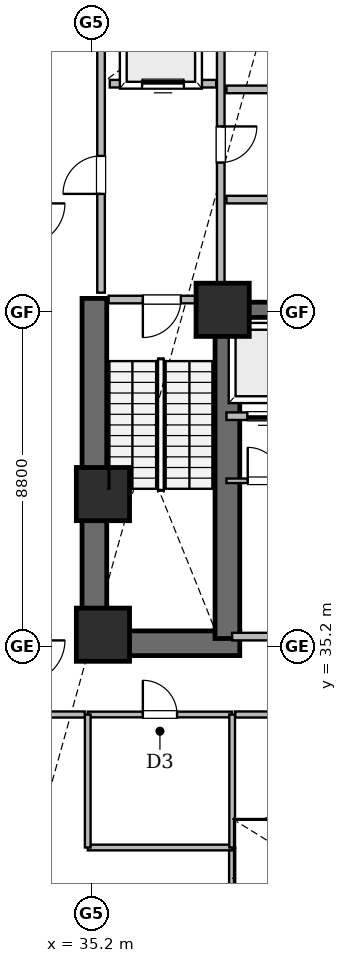
"""IFC4 building model, lengths in metres.
Left out: names, types, materials, properties, quantities, classifications, styles, units other than length and angle.
Written with IfcOpenShell. Run it as: python <this file> out.ifc"""

import sys

from ifc_helpers import new_model, si_unit, direction, frame, frame_2d, origin, origin_2d, place, context, subcontext, project, spatial, rectangle, extrude, element, fill, save


model = new_model("IFC4")
c1 = context("Model", 3, precision=1e-05, world=origin(), true_north=direction((0.0, 1.0)))
c2 = subcontext(c1, "Body", "Model", "MODEL_VIEW")
j1 = project(units=[si_unit("LENGTHUNIT", "METRE"), si_unit("PLANEANGLEUNIT", "RADIAN")], contexts=[c1])
p1 = place(None, origin())
s1 = spatial("IfcSite", under=j1, at=p1, CompositionType="ELEMENT")
p2 = place(p1, origin())
s2 = spatial("IfcBuilding", under=s1, at=p2, CompositionType="ELEMENT")
p3 = place(p2, frame((0.0, 0.0, 4.8)))
s3 = spatial("IfcBuildingStorey", under=s2, at=p3, CompositionType="ELEMENT", Elevation=4.8)
p4 = place(p3, frame((34.95, 35.275, 0.0), z_axis=(0.0, 0.0, 1.0), x_axis=(1.0, 0.0, 0.0)))
e1 = element("IfcWall", 1, at=p4, inside=s3, PredefinedType="SHEAR", context=c2, shape_type="SweptSolid", body=[
    extrude(rectangle(XDim=4.15, YDim=0.65, at=frame_2d((2.075, 0.0))), origin(), (0.0, 0.0, 1.0), 4.5),
])
p5 = place(p3, frame((35.275, 34.95, 0.0), z_axis=(0.0, 0.0, 1.0), x_axis=(0.0, 1.0, 0.0)))
e2 = element("IfcWall", 2, at=p5, inside=s3, PredefinedType="SHEAR", context=c2, shape_type="SweptSolid", body=[
    extrude(rectangle(XDim=9.4, YDim=0.65, at=frame_2d((4.7, 0.0))), origin(), (0.0, 0.0, 1.0), 4.5),
])
p6 = place(p3, frame((38.775, 35.4, 0.0), z_axis=(0.0, 0.0, 1.0), x_axis=(0.0, 1.0, 0.0)))
e3 = element("IfcWall", 3, at=p6, inside=s3, PredefinedType="SHEAR", context=c2, shape_type="SweptSolid", body=[
    extrude(rectangle(XDim=8.95, YDim=0.65, at=frame_2d((4.475, 0.0))), origin(), (0.0, 0.0, 1.0), 4.5),
])
p7 = place(p3, frame((38.75, 44.05, 0.0), z_axis=(0.0, 0.0, 1.0), x_axis=(1.0, 0.0, 0.0)))
e4 = element("IfcWall", 4, at=p7, inside=s3, PredefinedType="SHEAR", context=c2, shape_type="SweptSolid", body=[
    extrude(rectangle(XDim=4.2, YDim=0.4, at=frame_2d((2.1, 0.0))), origin(), (0.0, 0.0, 1.0), 4.5),
])
for number, where, z_axis, x_axis in (
    (5, (35.5, 35.5, 0.0), (0.0, 0.0, 1.0), (1.0, 0.0, 0.0)),
    (6, (38.65, 44.05, 0.0), (0.0, 0.0, 1.0), (1.0, 0.0, 0.0)),
    (7, (35.5, 39.2, 0.0), (0.0, 0.0, 1.0), (1.0, 0.0, 0.0)),
):
    element("IfcColumn", number, at=place(p3, frame(where, z_axis=z_axis, x_axis=x_axis)), inside=s3, PredefinedType="COLUMN", context=c2, shape_type="SweptSolid", body=[
        extrude(rectangle(XDim=1.4, YDim=1.4, at=origin_2d()), origin(), (0.0, 0.0, 1.0), 4.8),
    ])
p8 = place(p3, frame((38.9, 35.45, 0.0), z_axis=(0.0, 0.0, 1.0), x_axis=(1.0, 0.0, 0.0)))
e8 = element("IfcWall", 8, at=p8, inside=s3, PredefinedType="SOLIDWALL", context=c2, shape_type="SweptSolid", body=[
    extrude(rectangle(XDim=10.2, YDim=0.2, at=frame_2d((5.1, 0.0))), origin(), (0.0, 0.0, 1.0), 4.5),
])
p9 = place(p8, frame((4.6, 0.0, 0.0)))
e9 = element("IfcOpeningElement", 9, at=p9, cuts=e8, PredefinedType="OPENING", context=c2, shape_type="SweptSolid", body=[
    extrude(rectangle(XDim=1.0, YDim=2.15, at=frame_2d((0.5, 1.075))), frame((0.0, 0.11, 0.0), z_axis=(0.0, -1.0, 0.0), x_axis=(1.0, 0.0, 0.0)), (0.0, 0.0, 1.0), 0.22),
])
p10 = place(p3, frame((35.45, 44.5, 0.0), z_axis=(0.0, 0.0, 1.0), x_axis=(0.0, 1.0, 0.0)))
e10 = element("IfcWall", 10, at=p10, inside=s3, PredefinedType="SOLIDWALL", context=c2, shape_type="SweptSolid", body=[
    extrude(rectangle(XDim=7.92, YDim=0.2, at=frame_2d((3.96, 0.0))), origin(), (0.0, 0.0, 1.0), 4.5),
])
p11 = place(p10, frame((2.6, 0.0, 0.0)))
e11 = element("IfcOpeningElement", 11, at=p11, cuts=e10, PredefinedType="OPENING", context=c2, shape_type="SweptSolid", body=[
    extrude(rectangle(XDim=1.0, YDim=2.15, at=frame_2d((0.5, 1.075))), frame((0.0, 0.11, 0.0), z_axis=(0.0, -1.0, 0.0), x_axis=(1.0, 0.0, 0.0)), (0.0, 0.0, 1.0), 0.22),
])
p12 = place(p3, frame((38.6, 44.5, 0.0), z_axis=(0.0, 0.0, 1.0), x_axis=(0.0, 1.0, 0.0)))
e12 = element("IfcWall", 12, at=p12, inside=s3, PredefinedType="SOLIDWALL", context=c2, shape_type="SweptSolid", body=[
    extrude(rectangle(XDim=7.92, YDim=0.2, at=frame_2d((3.96, 0.0))), origin(), (0.0, 0.0, 1.0), 4.5),
])
p13 = place(p12, frame((3.425, 0.0, 0.0)))
e13 = element("IfcOpeningElement", 13, at=p13, cuts=e12, PredefinedType="OPENING", context=c2, shape_type="SweptSolid", body=[
    extrude(rectangle(XDim=0.95, YDim=2.15, at=frame_2d((0.475, 1.075))), frame((0.0, 0.11, 0.0), z_axis=(0.0, -1.0, 0.0), x_axis=(1.0, 0.0, 0.0)), (0.0, 0.0, 1.0), 0.22),
])
p14 = place(p3, frame((38.75, 41.25, 0.0), z_axis=(0.0, 0.0, 1.0), x_axis=(1.0, 0.0, 0.0)))
e14 = element("IfcWall", 14, at=p14, inside=s3, PredefinedType="SOLIDWALL", context=c2, shape_type="SweptSolid", body=[
    extrude(rectangle(XDim=4.33, YDim=0.2, at=frame_2d((2.165, 0.0))), origin(), (0.0, 0.0, 1.0), 4.5),
])
p15 = place(p14, frame((0.55, 0.0, 0.0)))
e15 = element("IfcOpeningElement", 15, at=p15, cuts=e14, PredefinedType="OPENING", context=c2, shape_type="SweptSolid", body=[
    extrude(rectangle(XDim=1.0, YDim=2.15, at=frame_2d((0.5, 1.075))), frame((0.0, 0.11, 0.0), z_axis=(0.0, -1.0, 0.0), x_axis=(1.0, 0.0, 0.0)), (0.0, 0.0, 1.0), 0.22),
])
p16 = place(p14, frame((2.75, 0.0, 0.0)))
e16 = element("IfcOpeningElement", 16, at=p16, cuts=e14, PredefinedType="OPENING", context=c2, shape_type="SweptSolid", body=[
    extrude(rectangle(XDim=1.0, YDim=2.15, at=frame_2d((0.5, 1.075))), frame((0.0, 0.11, 0.0), z_axis=(0.0, -1.0, 0.0), x_axis=(1.0, 0.0, 0.0)), (0.0, 0.0, 1.0), 0.22),
])
p17 = place(p3, frame((38.75, 39.55, 0.0), z_axis=(0.0, 0.0, 1.0), x_axis=(1.0, 0.0, 0.0)))
e17 = element("IfcWall", 17, at=p17, inside=s3, PredefinedType="PARTITIONING", context=c2, shape_type="SweptSolid", body=[
    extrude(rectangle(XDim=4.33, YDim=0.12, at=frame_2d((2.165, 0.0))), origin(), (0.0, 0.0, 1.0), 4.5),
])
p18 = place(p17, frame((0.56, 0.0, 0.0)))
e18 = element("IfcOpeningElement", 18, at=p18, cuts=e17, PredefinedType="OPENING", context=c2, shape_type="SweptSolid", body=[
    extrude(rectangle(XDim=0.88, YDim=2.1, at=frame_2d((0.44, 1.05))), frame((0.0, 0.07, 0.0), z_axis=(0.0, -1.0, 0.0), x_axis=(1.0, 0.0, 0.0)), (0.0, 0.0, 1.0), 0.14),
])
p19 = place(p17, frame((2.86, 0.0, 0.0)))
e19 = element("IfcOpeningElement", 19, at=p19, cuts=e17, PredefinedType="OPENING", context=c2, shape_type="SweptSolid", body=[
    extrude(rectangle(XDim=0.88, YDim=2.1, at=frame_2d((0.44, 1.05))), frame((0.0, 0.07, 0.0), z_axis=(0.0, -1.0, 0.0), x_axis=(1.0, 0.0, 0.0)), (0.0, 0.0, 1.0), 0.14),
])
p20 = place(p3, frame((35.1, 33.4, 0.0), z_axis=(0.0, 0.0, 1.0), x_axis=(1.0, 0.0, 0.0)))
e20 = element("IfcWall", 20, at=p20, inside=s3, PredefinedType="PLUMBINGWALL", context=c2, shape_type="SweptSolid", body=[
    extrude(rectangle(XDim=3.8, YDim=0.15, at=frame_2d((1.9, 0.0))), origin(), (0.0, 0.0, 1.0), 4.0),
])
p21 = place(p20, frame((1.45, 0.0, 0.0)))
e21 = element("IfcOpeningElement", 21, at=p21, cuts=e20, PredefinedType="OPENING", context=c2, shape_type="SweptSolid", body=[
    extrude(rectangle(XDim=0.9, YDim=2.1, at=frame_2d((0.45, 1.05))), frame((0.0, 0.085, 0.0), z_axis=(0.0, -1.0, 0.0), x_axis=(1.0, 0.0, 0.0)), (0.0, 0.0, 1.0), 0.17),
])
p22 = place(p3, frame((35.65, 44.32, 0.0), z_axis=(0.0, 0.0, 1.0), x_axis=(1.0, 0.0, 0.0)))
e22 = element("IfcWall", 22, at=p22, inside=s3, PredefinedType="SOLIDWALL", context=c2, shape_type="SweptSolid", body=[
    extrude(rectangle(XDim=2.8, YDim=0.2, at=frame_2d((1.4, 0.0))), origin(), (0.0, 0.0, 1.0), 4.5),
])
p23 = place(p22, frame((0.9, 0.0, 0.0)))
e23 = element("IfcOpeningElement", 23, at=p23, cuts=e22, PredefinedType="OPENING", context=c2, shape_type="SweptSolid", body=[
    extrude(rectangle(XDim=1.0, YDim=2.15, at=frame_2d((0.5, 1.075))), frame((0.0, 0.11, 0.0), z_axis=(0.0, -1.0, 0.0), x_axis=(1.0, 0.0, 0.0)), (0.0, 0.0, 1.0), 0.22),
])
p24 = place(p3, frame((35.68, 50.0, 0.0), z_axis=(0.0, 0.0, 1.0), x_axis=(1.0, 0.0, 0.0)))
e24 = element("IfcWall", 24, at=p24, inside=s3, PredefinedType="SOLIDWALL", context=c2, shape_type="SweptSolid", body=[
    extrude(rectangle(XDim=2.8, YDim=0.2, at=frame_2d((1.4, 0.0))), origin(), (0.0, 0.0, 1.0), 4.5),
])
p25 = place(p24, frame((0.85, 0.0, 0.0)))
e25 = element("IfcOpeningElement", 25, at=p25, cuts=e24, PredefinedType="OPENING", context=c2, shape_type="SweptSolid", body=[
    extrude(rectangle(XDim=1.1, YDim=2.15, at=frame_2d((0.55, 1.075))), frame((0.0, 0.11, 0.0), z_axis=(0.0, -1.0, 0.0), x_axis=(1.0, 0.0, 0.0)), (0.0, 0.0, 1.0), 0.22),
])
p26 = place(p3, frame((38.904, 14.635, 0.0), z_axis=(0.0, 0.0, 1.0), x_axis=(-0.000271891233, 0.999999963038, 0.0)))
e26 = element("IfcWall", 26, at=p26, inside=s3, PredefinedType="SOLIDWALL", context=c2, shape_type="SweptSolid", body=[
    extrude(rectangle(XDim=15.265, YDim=0.16, at=frame_2d((7.632, 0.0))), origin(), (0.0, 0.0, 1.0), 3.788),
])
p27 = place(p3, frame((38.98, 33.4, 0.0), z_axis=(0.0, 0.0, 1.0), x_axis=(1.0, 0.0, 0.0)))
e27 = element("IfcWall", 27, at=p27, inside=s3, PredefinedType="SOLIDWALL", context=c2, shape_type="SweptSolid", body=[
    extrude(rectangle(XDim=10.04, YDim=0.16, at=frame_2d((5.02, 0.0))), origin(), (0.0, 0.0, 1.0), 4.5),
])
p28 = place(p3, frame((38.75, 49.85, 0.0), z_axis=(0.0, 0.0, 1.0), x_axis=(1.0, 0.0, 0.0)))
e28 = element("IfcWall", 28, at=p28, inside=s3, PredefinedType="SOLIDWALL", context=c2, shape_type="SweptSolid", body=[
    extrude(rectangle(XDim=5.0, YDim=0.2, at=frame_2d((2.5, 0.0))), origin(), (0.0, 0.0, 1.0), 4.5),
])
p29 = place(p3, frame((38.75, 46.95, 0.0), z_axis=(0.0, 0.0, 1.0), x_axis=(1.0, 0.0, 0.0)))
e29 = element("IfcWall", 29, at=p29, inside=s3, PredefinedType="SOLIDWALL", context=c2, shape_type="SweptSolid", body=[
    extrude(rectangle(XDim=4.33, YDim=0.2, at=frame_2d((2.165, 0.0))), origin(), (0.0, 0.0, 1.0), 4.5),
])
p30 = place(p3, frame((35.1, 29.9, 0.0), z_axis=(0.0, 0.0, 1.0), x_axis=(1.0, 0.0, 0.0)))
e30 = element("IfcWall", 30, at=p30, inside=s3, PredefinedType="PLUMBINGWALL", context=c2, shape_type="SweptSolid", body=[
    extrude(rectangle(XDim=3.8, YDim=0.15, at=frame_2d((1.9, 0.0))), origin(), (0.0, 0.0, 1.0), 4.5),
])
p31 = place(p3, frame((35.1, 33.4, 0.0), z_axis=(0.0, 0.0, 1.0), x_axis=(0.0, -1.0, 0.0)))
e31 = element("IfcWall", 31, at=p31, inside=s3, PredefinedType="PLUMBINGWALL", context=c2, shape_type="SweptSolid", body=[
    extrude(rectangle(XDim=3.5, YDim=0.15, at=frame_2d((1.75, 0.0))), origin(), (0.0, 0.0, 1.0), 4.5),
])
p32 = place(p3, frame((38.9, 29.9, 0.0), z_axis=(0.0, 0.0, 1.0), x_axis=(0.0, 1.0, 0.0)))
e32 = element("IfcWall", 32, at=p32, inside=s3, PredefinedType="PLUMBINGWALL", context=c2, shape_type="SweptSolid", body=[
    extrude(rectangle(XDim=3.5, YDim=0.15, at=frame_2d((1.75, 0.0))), origin(), (0.0, 0.0, 1.0), 4.0),
])
p33 = place(p3, frame((33.48, 33.4, 0.0), z_axis=(0.0, 0.0, 1.0), x_axis=(1.0, 0.0, 0.0)))
e33 = element("IfcWall", 33, at=p33, inside=s3, PredefinedType="SOLIDWALL", context=c2, shape_type="SweptSolid", body=[
    extrude(rectangle(XDim=1.54, YDim=0.16, at=frame_2d((0.77, 0.0))), origin(), (0.0, 0.0, 1.0), 4.5),
])
p34 = place(p23, frame((1.0, 0.0, 0.0), z_axis=(0.0, 0.0, 1.0), x_axis=(-1.0, 0.0, 0.0)))
e34 = element("IfcDoor", 34, at=p34, inside=s3, OperationType="SINGLE_SWING_LEFT", PredefinedType="DOOR", context=c2, shape_type="SweptSolid", body=[
    extrude(rectangle(XDim=1.0, YDim=2.15, at=frame_2d((0.5, 1.075))), frame((0.0, 0.025, 0.0), z_axis=(0.0, -1.0, 0.0), x_axis=(1.0, 0.0, 0.0)), (0.0, 0.0, 1.0), 0.05),
])
fill(e23, e34)
p35 = place(p11, origin())
e35 = element("IfcDoor", 35, at=p35, inside=s3, OperationType="SINGLE_SWING_LEFT", PredefinedType="DOOR", context=c2, shape_type="SweptSolid", body=[
    extrude(rectangle(XDim=1.0, YDim=2.15, at=frame_2d((0.5, 1.075))), frame((0.0, 0.025, 0.0), z_axis=(0.0, -1.0, 0.0), x_axis=(1.0, 0.0, 0.0)), (0.0, 0.0, 1.0), 0.05),
])
fill(e11, e35)
p36 = place(p13, frame((0.95, 0.0, 0.0), z_axis=(0.0, 0.0, 1.0), x_axis=(-1.0, 0.0, 0.0)))
e36 = element("IfcDoor", 36, at=p36, inside=s3, OperationType="SINGLE_SWING_RIGHT", PredefinedType="DOOR", context=c2, shape_type="SweptSolid", body=[
    extrude(rectangle(XDim=0.95, YDim=2.15, at=frame_2d((0.475, 1.075))), frame((0.0, 0.025, 0.0), z_axis=(0.0, -1.0, 0.0), x_axis=(1.0, 0.0, 0.0)), (0.0, 0.0, 1.0), 0.05),
])
fill(e13, e36)
p37 = place(p25, origin())
e37 = element("IfcDoor", 37, at=p37, inside=s3, OperationType="SLIDING_TO_LEFT", PredefinedType="DOOR", context=c2, shape_type="SweptSolid", body=[
    extrude(rectangle(XDim=1.1, YDim=2.15, at=frame_2d((0.55, 1.075))), frame((0.0, 0.025, 0.0), z_axis=(0.0, -1.0, 0.0), x_axis=(1.0, 0.0, 0.0)), (0.0, 0.0, 1.0), 0.05),
])
fill(e25, e37)
p38 = place(p15, frame((1.0, 0.0, 0.0), z_axis=(0.0, 0.0, 1.0), x_axis=(-1.0, 0.0, 0.0)))
e38 = element("IfcDoor", 38, at=p38, inside=s3, OperationType="SLIDING_TO_LEFT", PredefinedType="DOOR", context=c2, shape_type="SweptSolid", body=[
    extrude(rectangle(XDim=1.0, YDim=2.15, at=frame_2d((0.5, 1.075))), frame((0.0, 0.025, 0.0), z_axis=(0.0, -1.0, 0.0), x_axis=(1.0, 0.0, 0.0)), (0.0, 0.0, 1.0), 0.05),
])
fill(e15, e38)
p39 = place(p18, origin())
e39 = element("IfcDoor", 39, at=p39, inside=s3, OperationType="SINGLE_SWING_LEFT", PredefinedType="DOOR", context=c2, shape_type="SweptSolid", body=[
    extrude(rectangle(XDim=0.88, YDim=2.1, at=frame_2d((0.44, 1.05))), frame((0.0, 0.025, 0.0), z_axis=(0.0, -1.0, 0.0), x_axis=(1.0, 0.0, 0.0)), (0.0, 0.0, 1.0), 0.05),
])
fill(e18, e39)
p40 = place(p21, origin())
e40 = element("IfcDoor", 40, at=p40, inside=s3, OperationType="SINGLE_SWING_LEFT", PredefinedType="DOOR", context=c2, shape_type="SweptSolid", body=[
    extrude(rectangle(XDim=0.9, YDim=2.1, at=frame_2d((0.45, 1.05))), frame((0.0, 0.025, 0.0), z_axis=(0.0, -1.0, 0.0), x_axis=(1.0, 0.0, 0.0)), (0.0, 0.0, 1.0), 0.05),
])
fill(e21, e40)
save(model, sys.argv[1])
